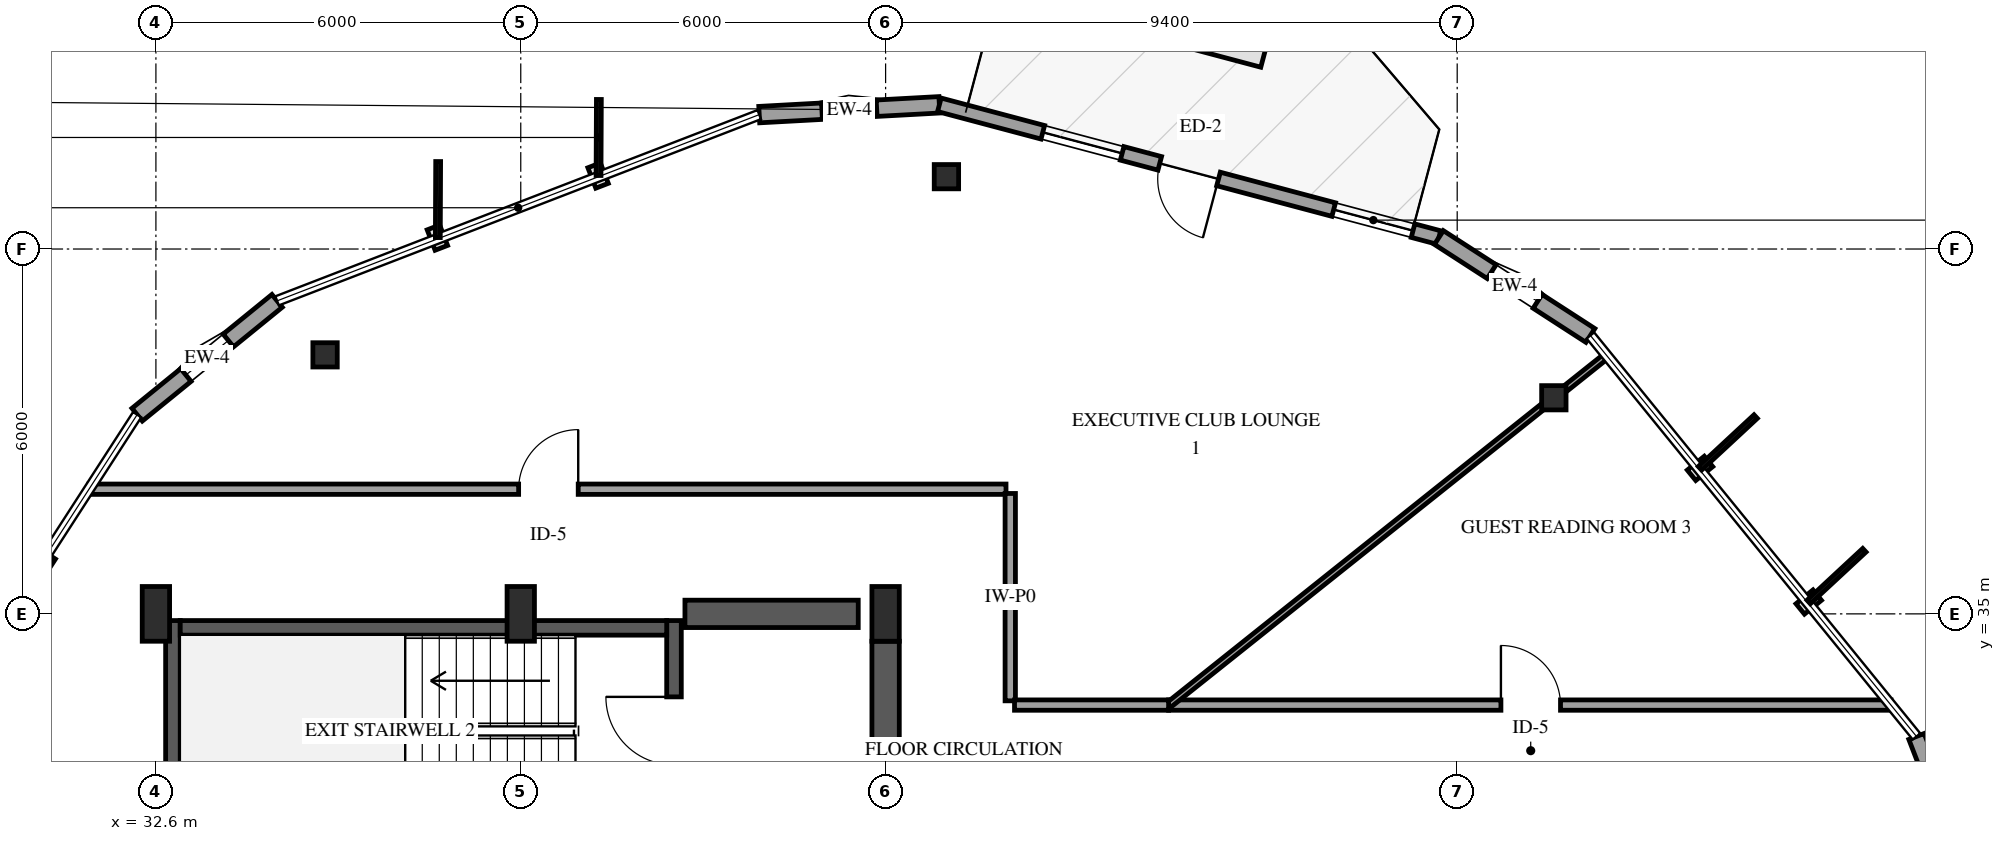
"""IFC4 building model, lengths in metres.
Left out: names, types, materials, properties, quantities, classifications, styles, units other than length and angle.
Written with IfcOpenShell. Run it as: python <this file> out.ifc"""

import sys

from ifc_helpers import new_model, si_unit, direction, frame, frame_2d, origin, origin_2d, place, context, subcontext, project, spatial, rectangle, i_section, extrude, element, fill, save


model = new_model("IFC4")
c1 = context("Model", 3, precision=1e-05, world=origin(), true_north=direction((0.0, 1.0)))
c2 = subcontext(c1, "Body", "Model", "MODEL_VIEW")
j1 = project(units=[si_unit("LENGTHUNIT", "METRE"), si_unit("PLANEANGLEUNIT", "RADIAN")], contexts=[c1])
p1 = place(None, origin())
s1 = spatial("IfcSite", under=j1, at=p1, CompositionType="ELEMENT")
p2 = place(p1, origin())
s2 = spatial("IfcBuilding", under=s1, at=p2, CompositionType="ELEMENT")
p3 = place(p2, frame((0.0, 0.0, 242.5)))
s3 = spatial("IfcBuildingStorey", under=s2, at=p3, CompositionType="ELEMENT", Elevation=242.5)
p4 = place(p3, frame((32.88, 31.26, 0.0), z_axis=(0.0, 0.0, 1.0), x_axis=(0.0, 1.0, 0.0)))
e1 = element("IfcWall", 1, at=p4, inside=s3, PredefinedType="SHEAR", context=c2, shape_type="SweptSolid", body=[
    extrude(rectangle(XDim=3.63, YDim=0.24, at=frame_2d((1.815, 0.0))), origin(), (0.0, 0.0, 1.0), 3.75),
])
p5 = place(p3, frame((41.12, 31.26, 0.0), z_axis=(0.0, 0.0, 1.0), x_axis=(0.0, 1.0, 0.0)))
e2 = element("IfcWall", 2, at=p5, inside=s3, PredefinedType="SHEAR", context=c2, shape_type="SweptSolid", body=[
    extrude(rectangle(XDim=3.63, YDim=0.24, at=frame_2d((1.815, 0.0))), origin(), (0.0, 0.0, 1.0), 3.75),
])
p6 = place(p5, frame((1.255, 0.0, 0.0)))
e3 = element("IfcOpeningElement", 3, at=p6, cuts=e2, PredefinedType="OPENING", context=c2, shape_type="SweptSolid", body=[
    extrude(rectangle(XDim=1.12, YDim=2.15, at=frame_2d((0.56, 1.075))), frame((0.0, 0.13, 0.0), z_axis=(0.0, -1.0, 0.0), x_axis=(1.0, 0.0, 0.0)), (0.0, 0.0, 1.0), 0.26),
])
p7 = place(p3, frame((33.0, 34.77, 0.0), z_axis=(0.0, 0.0, 1.0), x_axis=(1.0, 0.0, 0.0)))
e4 = element("IfcWall", 4, at=p7, inside=s3, PredefinedType="SHEAR", context=c2, shape_type="SweptSolid", body=[
    extrude(rectangle(XDim=8.0, YDim=0.24, at=frame_2d((4.0, 0.0))), origin(), (0.0, 0.0, 1.0), 3.75),
])
p8 = place(p3, frame((41.3, 35.0, 0.0), z_axis=(0.0, 0.0, 1.0), x_axis=(1.0, 0.0, 0.0)))
e5 = element("IfcWall", 5, at=p8, inside=s3, PredefinedType="SHEAR", context=c2, shape_type="SweptSolid", body=[
    extrude(rectangle(XDim=2.85, YDim=0.45, at=frame_2d((1.425, 0.0))), origin(), (0.0, 0.0, 1.0), 3.75),
])
p9 = place(p3, frame((44.6, 29.8, 0.0), z_axis=(0.0, 0.0, 1.0), x_axis=(0.0, 1.0, 0.0)))
e6 = element("IfcWall", 6, at=p9, inside=s3, PredefinedType="SHEAR", context=c2, shape_type="SweptSolid", body=[
    extrude(rectangle(XDim=4.75, YDim=0.45, at=frame_2d((2.375, 0.0))), origin(), (0.0, 0.0, 1.0), 3.75),
])
for number, where, z_axis, x_axis in (
    (7, (32.6, 35.0, -0.3), (0.0, 0.0, 1.0), (1.0, 0.0, 0.0)),
    (8, (38.6, 35.0, -0.3), (0.0, 0.0, 1.0), (1.0, 0.0, 0.0)),
    (9, (44.6, 35.0, -0.3), (0.0, 0.0, 1.0), (1.0, 0.0, 0.0)),
):
    element("IfcColumn", number, at=place(p3, frame(where, z_axis=z_axis, x_axis=x_axis)), inside=s3, PredefinedType="PILASTER", context=c2, shape_type="SweptSolid", body=[
        extrude(rectangle(XDim=0.45, YDim=0.9, at=origin_2d()), origin(), (0.0, 0.0, 1.0), 4.05),
    ])
for number, where, z_axis, x_axis in (
    (10, (55.589, 38.554, -0.3), (0.0, 0.0, 1.0), (1.0, 0.0, 0.0)),
    (11, (45.6, 42.189, -0.3), (0.0, 0.0, 1.0), (1.0, 0.0, 0.0)),
    (12, (35.382, 39.26, -0.3), (0.0, 0.0, 1.0), (1.0, 0.0, 0.0)),
):
    element("IfcColumn", number, at=place(p3, frame(where, z_axis=z_axis, x_axis=x_axis)), inside=s3, PredefinedType="COLUMN", context=c2, shape_type="SweptSolid", body=[
        extrude(i_section(OverallWidth=0.401, OverallDepth=0.399, WebThickness=0.025, FlangeThickness=0.04, FilletRadius=0.038, at=origin_2d()), origin(), (0.0, 0.0, 1.0), 4.05),
    ])
p10 = place(p3, frame((45.484, 43.372, 0.0), z_axis=(0.0, 0.0, 1.0), x_axis=(-0.998519286297, -0.054398850098, 0.0)))
e13 = element("IfcWall", 13, at=p10, inside=s3, PredefinedType="SOLIDWALL", context=c2, shape_type="SweptSolid", body=[
    extrude(rectangle(XDim=2.967, YDim=0.27, at=frame_2d((1.483, 0.0))), origin(), (0.0, 0.0, 1.0), 2.829),
])
p11 = place(p10, frame((1.033, 0.0, 0.75)))
e14 = element("IfcOpeningElement", 14, at=p11, cuts=e13, PredefinedType="OPENING", context=c2, shape_type="SweptSolid", body=[
    extrude(rectangle(XDim=0.9, YDim=1.5, at=frame_2d((0.45, 0.75))), frame((0.0, 0.145, 0.0), z_axis=(0.0, -1.0, 0.0), x_axis=(1.0, 0.0, 0.0)), (0.0, 0.0, 1.0), 0.29),
])
p12 = place(p3, frame((53.699, 41.189, 0.0), z_axis=(0.0, 0.0, 1.0), x_axis=(-0.966469089983, 0.256782978615, 0.0)))
e15 = element("IfcWall", 15, at=p12, inside=s3, PredefinedType="SOLIDWALL", context=c2, shape_type="SweptSolid", body=[
    extrude(rectangle(XDim=8.5, YDim=0.23, at=frame_2d((4.25, 0.0))), origin(), (0.0, 0.0, 1.0), 2.829),
])
p13 = place(p12, frame((3.75, 0.0, 0.0)))
e16 = element("IfcOpeningElement", 16, at=p13, cuts=e15, PredefinedType="OPENING", context=c2, shape_type="SweptSolid", body=[
    extrude(rectangle(XDim=1.0, YDim=2.15, at=frame_2d((0.5, 1.075))), frame((0.0, 0.125, 0.0), z_axis=(0.0, -1.0, 0.0), x_axis=(1.0, 0.0, 0.0)), (0.0, 0.0, 1.0), 0.25),
])
p14 = place(p12, frame((0.44, 0.0, 0.72)))
e17 = element("IfcOpeningElement", 17, at=p14, cuts=e15, PredefinedType="OPENING", context=c2, shape_type="SweptSolid", body=[
    extrude(rectangle(XDim=1.35, YDim=1.65, at=frame_2d((0.675, 0.825))), frame((0.0, 0.125, 0.0), z_axis=(0.0, -1.0, 0.0), x_axis=(1.0, 0.0, 0.0)), (0.0, 0.0, 1.0), 0.25),
])
p15 = place(p12, frame((5.39, 0.0, 0.72)))
e18 = element("IfcOpeningElement", 18, at=p15, cuts=e15, PredefinedType="OPENING", context=c2, shape_type="SweptSolid", body=[
    extrude(rectangle(XDim=1.35, YDim=1.65, at=frame_2d((0.675, 0.825))), frame((0.0, 0.125, 0.0), z_axis=(0.0, -1.0, 0.0), x_axis=(1.0, 0.0, 0.0)), (0.0, 0.0, 1.0), 0.25),
])
p16 = place(p3, frame((34.593, 40.147, 0.0), z_axis=(0.0, 0.0, 1.0), x_axis=(-0.77584960114, -0.630917899898, 0.0)))
e19 = element("IfcWall", 19, at=p16, inside=s3, PredefinedType="SOLIDWALL", context=c2, shape_type="SweptSolid", body=[
    extrude(rectangle(XDim=2.967, YDim=0.27, at=frame_2d((1.483, 0.0))), origin(), (0.0, 0.0, 1.0), 2.829),
])
p17 = place(p16, frame((1.033, 0.0, 0.75)))
e20 = element("IfcOpeningElement", 20, at=p17, cuts=e19, PredefinedType="OPENING", context=c2, shape_type="SweptSolid", body=[
    extrude(rectangle(XDim=0.9, YDim=1.5, at=frame_2d((0.45, 0.75))), frame((0.0, 0.145, 0.0), z_axis=(0.0, -1.0, 0.0), x_axis=(1.0, 0.0, 0.0)), (0.0, 0.0, 1.0), 0.29),
])
p18 = place(p3, frame((62.622, 30.217, 0.0), z_axis=(0.0, 0.0, 1.0), x_axis=(-0.3603683584, 0.93281008049, 0.0)))
e21 = element("IfcWall", 21, at=p18, inside=s3, PredefinedType="SOLIDWALL", context=c2, shape_type="SweptSolid", body=[
    extrude(rectangle(XDim=2.967, YDim=0.27, at=frame_2d((1.483, 0.0))), origin(), (0.0, 0.0, 1.0), 2.829),
])
p19 = place(p3, frame((56.19, 39.578, 0.0), z_axis=(0.0, 0.0, 1.0), x_axis=(-0.839779856866, 0.54292705956, 0.0)))
e22 = element("IfcWall", 22, at=p19, inside=s3, PredefinedType="SOLIDWALL", context=c2, shape_type="SweptSolid", body=[
    extrude(rectangle(XDim=2.967, YDim=0.27, at=frame_2d((1.483, 0.0))), origin(), (0.0, 0.0, 1.0), 2.829),
])
p20 = place(p19, frame((1.033, 0.0, 0.75)))
e23 = element("IfcOpeningElement", 23, at=p20, cuts=e22, PredefinedType="OPENING", context=c2, shape_type="SweptSolid", body=[
    extrude(rectangle(XDim=0.9, YDim=1.5, at=frame_2d((0.45, 0.75))), frame((0.0, 0.145, 0.0), z_axis=(0.0, -1.0, 0.0), x_axis=(1.0, 0.0, 0.0)), (0.0, 0.0, 1.0), 0.29),
])
p21 = place(p3, frame((31.499, 37.05, 0.0), z_axis=(0.0, 0.0, 1.0), x_axis=(1.0, 0.0, 0.0)))
e24 = element("IfcWall", 24, at=p21, inside=s3, PredefinedType="PARTITIONING", context=c2, shape_type="SweptSolid", body=[
    extrude(rectangle(XDim=15.081, YDim=0.17, at=frame_2d((7.541, 0.0))), origin(), (0.0, 0.0, 1.0), 3.45),
])
p22 = place(p21, frame((7.066, 0.0, 0.0)))
e25 = element("IfcOpeningElement", 25, at=p22, cuts=e24, PredefinedType="OPENING", context=c2, shape_type="SweptSolid", body=[
    extrude(rectangle(XDim=0.98, YDim=2.15, at=frame_2d((0.49, 1.075))), frame((0.0, 0.095, 0.0), z_axis=(0.0, -1.0, 0.0), x_axis=(1.0, 0.0, 0.0)), (0.0, 0.0, 1.0), 0.19),
])
p23 = place(p3, frame((49.254, 33.5, 0.0), z_axis=(0.0, 0.0, 1.0), x_axis=(1.0, 0.0, 0.0)))
e26 = element("IfcWall", 26, at=p23, inside=s3, PredefinedType="PARTITIONING", context=c2, shape_type="SweptSolid", body=[
    extrude(rectangle(XDim=11.88, YDim=0.17, at=frame_2d((5.94, 0.0))), origin(), (0.0, 0.0, 1.0), 3.45),
])
p24 = place(p23, frame((5.465, 0.0, 0.0)))
e27 = element("IfcOpeningElement", 27, at=p24, cuts=e26, PredefinedType="OPENING", context=c2, shape_type="SweptSolid", body=[
    extrude(rectangle(XDim=0.98, YDim=2.15, at=frame_2d((0.49, 1.075))), frame((0.0, 0.095, 0.0), z_axis=(0.0, -1.0, 0.0), x_axis=(1.0, 0.0, 0.0)), (0.0, 0.0, 1.0), 0.19),
])
p25 = place(p3, frame((49.254, 33.5, 0.0), z_axis=(0.0, 0.0, 1.0), x_axis=(0.781767361653, 0.623570198337, 0.0)))
e28 = element("IfcWall", 28, at=p25, inside=s3, PredefinedType="PARTITIONING", context=c2, shape_type="SweptSolid", body=[
    extrude(rectangle(XDim=9.216, YDim=0.1, at=frame_2d((4.608, 0.0))), origin(), (0.0, 0.0, 1.0), 3.45),
])
p26 = place(p3, frame((46.65, 36.98, 0.0), z_axis=(0.0, 0.0, 1.0), x_axis=(0.0, -1.0, 0.0)))
e29 = element("IfcWall", 29, at=p26, inside=s3, PredefinedType="PARTITIONING", context=c2, shape_type="SweptSolid", body=[
    extrude(rectangle(XDim=3.41, YDim=0.17, at=frame_2d((1.705, 0.0))), origin(), (0.0, 0.0, 1.0), 3.45),
])
p27 = place(p3, frame((46.72, 33.5, 0.0), z_axis=(0.0, 0.0, 1.0), x_axis=(1.0, 0.0, 0.0)))
e30 = element("IfcWall", 30, at=p27, inside=s3, PredefinedType="PARTITIONING", context=c2, shape_type="SweptSolid", body=[
    extrude(rectangle(XDim=2.534, YDim=0.17, at=frame_2d((1.267, 0.0))), origin(), (0.0, 0.0, 1.0), 3.45),
])
p28 = place(p11, origin())
e31 = element("IfcWindow", 31, at=p28, inside=s3, PartitioningType="SINGLE_PANEL", PredefinedType="WINDOW", context=c2, shape_type="SweptSolid", body=[
    extrude(rectangle(XDim=0.9, YDim=1.5, at=frame_2d((0.45, 0.75))), frame((0.0, 0.03, 0.0), z_axis=(0.0, -1.0, 0.0), x_axis=(1.0, 0.0, 0.0)), (0.0, 0.0, 1.0), 0.06),
])
fill(e14, e31)
p29 = place(p13, origin())
e32 = element("IfcDoor", 32, at=p29, inside=s3, OperationType="SINGLE_SWING_LEFT", PredefinedType="DOOR", context=c2, shape_type="SweptSolid", body=[
    extrude(rectangle(XDim=1.0, YDim=2.15, at=frame_2d((0.5, 1.075))), frame((0.0, 0.025, 0.0), z_axis=(0.0, -1.0, 0.0), x_axis=(1.0, 0.0, 0.0)), (0.0, 0.0, 1.0), 0.05),
])
fill(e16, e32)
p30 = place(p14, origin())
e33 = element("IfcWindow", 33, at=p30, inside=s3, PartitioningType="SINGLE_PANEL", PredefinedType="WINDOW", context=c2, shape_type="SweptSolid", body=[
    extrude(rectangle(XDim=1.35, YDim=1.65, at=frame_2d((0.675, 0.825))), frame((0.0, 0.03, 0.0), z_axis=(0.0, -1.0, 0.0), x_axis=(1.0, 0.0, 0.0)), (0.0, 0.0, 1.0), 0.06),
])
fill(e17, e33)
p31 = place(p15, origin())
e34 = element("IfcWindow", 34, at=p31, inside=s3, PartitioningType="SINGLE_PANEL", PredefinedType="WINDOW", context=c2, shape_type="SweptSolid", body=[
    extrude(rectangle(XDim=1.35, YDim=1.65, at=frame_2d((0.675, 0.825))), frame((0.0, 0.03, 0.0), z_axis=(0.0, -1.0, 0.0), x_axis=(1.0, 0.0, 0.0)), (0.0, 0.0, 1.0), 0.06),
])
fill(e18, e34)
p32 = place(p17, origin())
e35 = element("IfcWindow", 35, at=p32, inside=s3, PartitioningType="SINGLE_PANEL", PredefinedType="WINDOW", context=c2, shape_type="SweptSolid", body=[
    extrude(rectangle(XDim=0.9, YDim=1.5, at=frame_2d((0.45, 0.75))), frame((0.0, 0.03, 0.0), z_axis=(0.0, -1.0, 0.0), x_axis=(1.0, 0.0, 0.0)), (0.0, 0.0, 1.0), 0.06),
])
fill(e20, e35)
p33 = place(p20, origin())
e36 = element("IfcWindow", 36, at=p33, inside=s3, PartitioningType="SINGLE_PANEL", PredefinedType="WINDOW", context=c2, shape_type="SweptSolid", body=[
    extrude(rectangle(XDim=0.9, YDim=1.5, at=frame_2d((0.45, 0.75))), frame((0.0, 0.03, 0.0), z_axis=(0.0, -1.0, 0.0), x_axis=(1.0, 0.0, 0.0)), (0.0, 0.0, 1.0), 0.06),
])
fill(e23, e36)
p34 = place(p6, origin())
e37 = element("IfcDoor", 37, at=p34, inside=s3, OperationType="SINGLE_SWING_RIGHT", PredefinedType="DOOR", context=c2, shape_type="SweptSolid", body=[
    extrude(rectangle(XDim=1.12, YDim=2.15, at=frame_2d((0.56, 1.075))), frame((0.0, 0.025, 0.0), z_axis=(0.0, -1.0, 0.0), x_axis=(1.0, 0.0, 0.0)), (0.0, 0.0, 1.0), 0.05),
])
fill(e3, e37)
p35 = place(p22, origin())
e38 = element("IfcDoor", 38, at=p35, inside=s3, OperationType="SINGLE_SWING_RIGHT", PredefinedType="DOOR", context=c2, shape_type="SweptSolid", body=[
    extrude(rectangle(XDim=0.98, YDim=2.15, at=frame_2d((0.49, 1.075))), frame((0.0, 0.025, 0.0), z_axis=(0.0, -1.0, 0.0), x_axis=(1.0, 0.0, 0.0)), (0.0, 0.0, 1.0), 0.05),
])
fill(e25, e38)
p36 = place(p24, origin())
e39 = element("IfcDoor", 39, at=p36, inside=s3, OperationType="SINGLE_SWING_LEFT", PredefinedType="DOOR", context=c2, shape_type="SweptSolid", body=[
    extrude(rectangle(XDim=0.98, YDim=2.15, at=frame_2d((0.49, 1.075))), frame((0.0, 0.025, 0.0), z_axis=(0.0, -1.0, 0.0), x_axis=(1.0, 0.0, 0.0)), (0.0, 0.0, 1.0), 0.05),
])
fill(e27, e39)
save(model, sys.argv[1])
